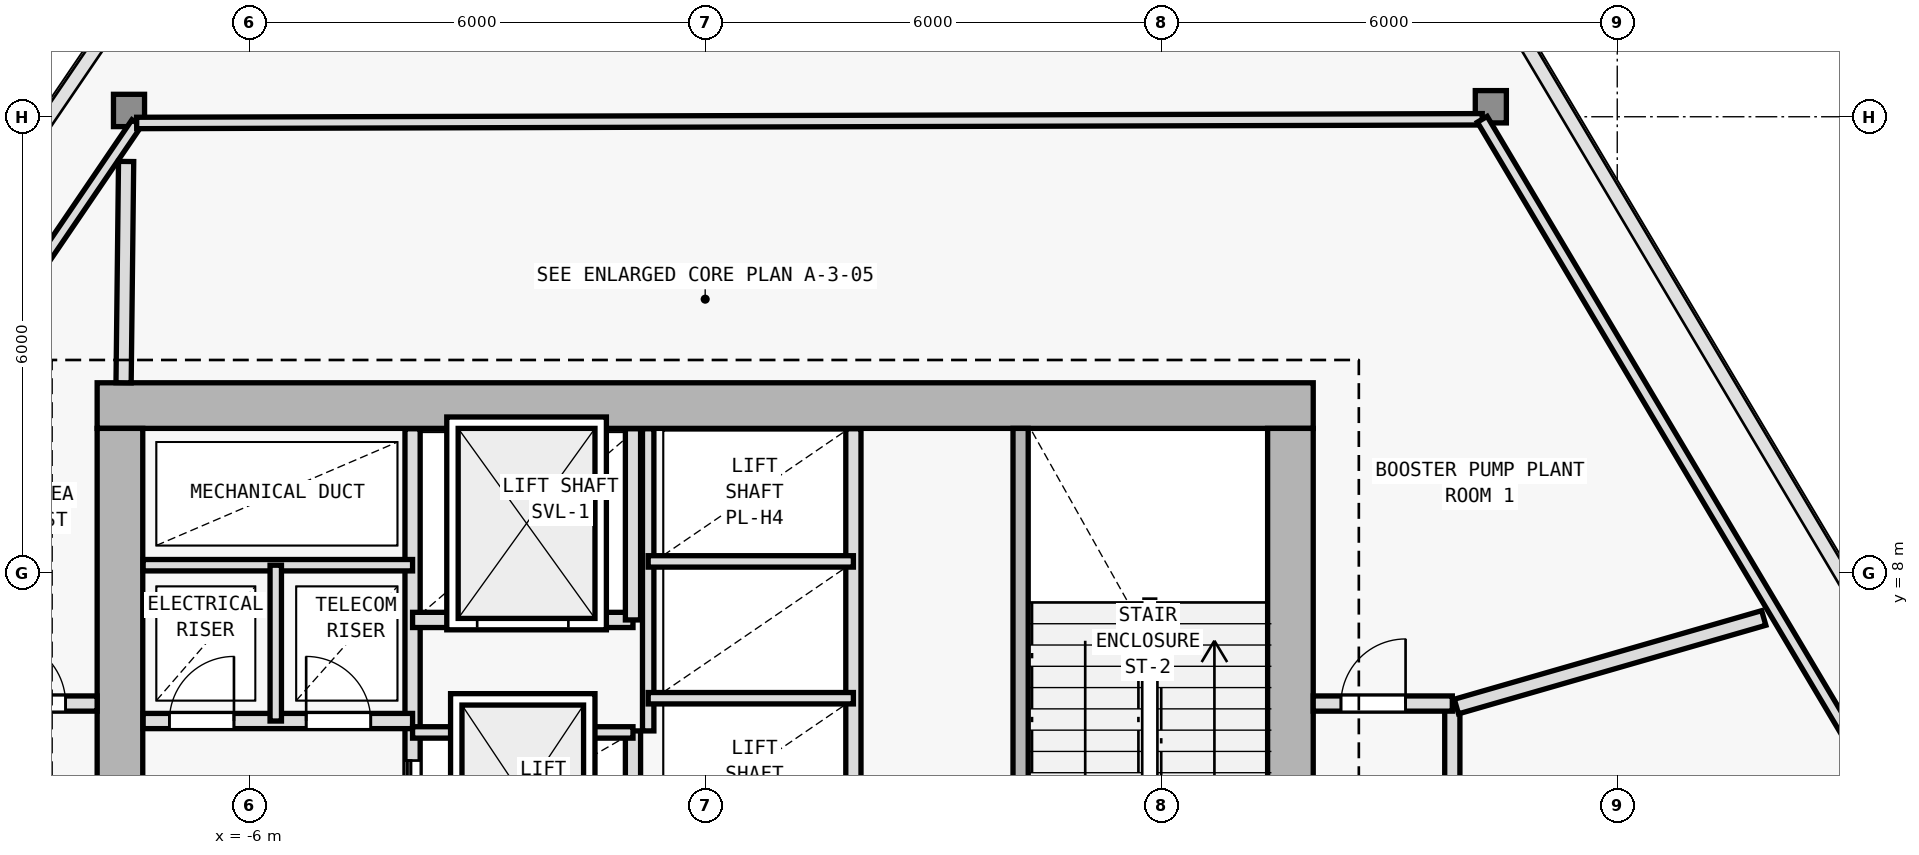
"""IFC4 building model, lengths in metres.
Left out: names, types, materials, properties, quantities, classifications, styles, units other than length and angle.
Written with IfcOpenShell. Run it as: python <this file> out.ifc"""

import sys

from ifc_helpers import new_model, si_unit, direction, frame, frame_2d, origin, origin_2d, place, context, subcontext, project, spatial, rectangle, i_section, extrude, element, fill, save


model = new_model("IFC4")
c1 = context("Model", 3, precision=1e-05, world=origin(), true_north=direction((0.0, 1.0)))
c2 = subcontext(c1, "Body", "Model", "MODEL_VIEW")
j1 = project(units=[si_unit("LENGTHUNIT", "METRE"), si_unit("PLANEANGLEUNIT", "RADIAN")], contexts=[c1])
p1 = place(None, origin())
s1 = spatial("IfcSite", under=j1, at=p1, CompositionType="ELEMENT")
p2 = place(p1, origin())
s2 = spatial("IfcBuilding", under=s1, at=p2, CompositionType="ELEMENT")
p3 = place(p2, frame((0.0, 0.0, 73.2)))
s3 = spatial("IfcBuildingStorey", under=s2, at=p3, CompositionType="ELEMENT", Elevation=73.2)
for number, where, z_axis, x_axis in (
    (1, (7.7, 10.2, 0.0), (0.0, 0.0, 1.0), (1.0, 0.0, 0.0)),
    (2, (-7.7, 10.2, 0.0), (0.0, 0.0, 1.0), (1.0, 0.0, 0.0)),
):
    element("IfcColumn", number, at=place(p3, frame(where, z_axis=z_axis, x_axis=x_axis)), inside=s3, PredefinedType="COLUMN", context=c2, shape_type="SweptSolid", body=[
        extrude(i_section(OverallWidth=0.416, OverallDepth=0.446, WebThickness=0.025, FlangeThickness=0.04, FilletRadius=0.015, at=origin_2d()), origin(), (0.0, 0.0, 1.0), 4.8),
    ])
p4 = place(p3, frame((10.337, 14.132, 0.006), z_axis=(-0.009074296177, -0.001988188488, 0.999956851197), x_axis=(0.214024191307, -0.976828360325, 0.0)))
e3 = element("IfcColumn", 3, at=p4, inside=s3, PredefinedType="COLUMN", context=c2, shape_type="SweptSolid", body=[
    extrude(i_section(OverallWidth=0.409, OverallDepth=0.425, WebThickness=0.021, FlangeThickness=0.034, FilletRadius=0.015, at=origin_2d()), origin(), (0.0, 0.0, 1.0), 4.789),
])
p5 = place(p3, frame((-7.581, 14.083, 0.006), z_axis=(0.006780355843, -0.001988224646, 0.999975036557), x_axis=(0.281384988428, 0.959594960537, 0.0)))
e4 = element("IfcColumn", 4, at=p5, inside=s3, PredefinedType="COLUMN", context=c2, shape_type="SweptSolid", body=[
    extrude(i_section(OverallWidth=0.409, OverallDepth=0.425, WebThickness=0.021, FlangeThickness=0.034, FilletRadius=0.015, at=origin_2d()), origin(), (0.0, 0.0, 1.0), 4.789),
])
p6 = place(p3, frame((8.0, 10.2, 0.0), z_axis=(0.0, 0.0, 1.0), x_axis=(-1.0, 0.0, 0.0)))
e5 = element("IfcWall", 5, at=p6, inside=s3, PredefinedType="SHEAR", context=c2, shape_type="SweptSolid", body=[
    extrude(rectangle(XDim=16.0, YDim=0.6, at=frame_2d((8.0, 0.0))), origin(), (0.0, 0.0, 1.0), 4.5),
])
p7 = place(p3, frame((-7.7, -9.1, 0.0), z_axis=(0.0, 0.0, 1.0), x_axis=(0.0, 1.0, 0.0)))
e6 = element("IfcWall", 6, at=p7, inside=s3, PredefinedType="SHEAR", context=c2, shape_type="SweptSolid", body=[
    extrude(rectangle(XDim=19.0, YDim=0.6, at=frame_2d((9.5, 0.0))), origin(), (0.0, 0.0, 1.0), 4.5),
])
p8 = place(p7, frame((12.65, 0.0, 0.0)))
e7 = element("IfcOpeningElement", 7, at=p8, cuts=e6, PredefinedType="OPENING", context=c2, shape_type="SweptSolid", body=[
    extrude(rectangle(XDim=1.1, YDim=2.15, at=frame_2d((0.55, 1.075))), frame((0.0, 0.31, 0.0), z_axis=(0.0, -1.0, 0.0), x_axis=(1.0, 0.0, 0.0)), (0.0, 0.0, 1.0), 0.62),
])
p9 = place(p3, frame((7.7, 9.9, 0.0), z_axis=(0.0, 0.0, 1.0), x_axis=(0.0, -1.0, 0.0)))
e8 = element("IfcWall", 8, at=p9, inside=s3, PredefinedType="SHEAR", context=c2, shape_type="SweptSolid", body=[
    extrude(rectangle(XDim=19.0, YDim=0.6, at=frame_2d((9.5, 0.0))), origin(), (0.0, 0.0, 1.0), 4.5),
])
p10 = place(p3, frame((-3.85, 1.35, 0.0), z_axis=(0.0, 0.0, 1.0), x_axis=(0.0, 1.0, 0.0)))
e9 = element("IfcWall", 9, at=p10, inside=s3, PredefinedType="SOLIDWALL", context=c2, shape_type="SweptSolid", body=[
    extrude(rectangle(XDim=8.545, YDim=0.2, at=frame_2d((4.272, 0.0))), origin(), (0.0, 0.0, 1.0), 4.5),
])
p11 = place(p10, frame((1.5, 0.0, 0.0)))
e10 = element("IfcOpeningElement", 10, at=p11, cuts=e9, PredefinedType="OPENING", context=c2, shape_type="SweptSolid", body=[
    extrude(rectangle(XDim=1.0, YDim=2.15, at=frame_2d((0.5, 1.075))), frame((0.0, 0.11, 0.0), z_axis=(0.0, -1.0, 0.0), x_axis=(1.0, 0.0, 0.0)), (0.0, 0.0, 1.0), 0.22),
])
p12 = place(p10, frame((3.18, 0.0, 0.0)))
e11 = element("IfcOpeningElement", 11, at=p12, cuts=e9, PredefinedType="OPENING", context=c2, shape_type="SweptSolid", body=[
    extrude(rectangle(XDim=1.0, YDim=2.15, at=frame_2d((0.5, 1.075))), frame((0.0, 0.11, 0.0), z_axis=(0.0, -1.0, 0.0), x_axis=(1.0, 0.0, 0.0)), (0.0, 0.0, 1.0), 0.22),
])
p13 = place(p3, frame((-7.395, 6.05, 0.0), z_axis=(0.0, 0.0, 1.0), x_axis=(1.0, 0.0, 0.0)))
e12 = element("IfcWall", 12, at=p13, inside=s3, PredefinedType="SOLIDWALL", context=c2, shape_type="SweptSolid", body=[
    extrude(rectangle(XDim=3.545, YDim=0.2, at=frame_2d((1.772, 0.0))), origin(), (0.0, 0.0, 1.0), 4.5),
])
p14 = place(p13, frame((0.345, 0.0, 0.0)))
e13 = element("IfcOpeningElement", 13, at=p14, cuts=e12, PredefinedType="OPENING", context=c2, shape_type="SweptSolid", body=[
    extrude(rectangle(XDim=0.85, YDim=2.1, at=frame_2d((0.425, 1.05))), frame((0.0, 0.11, 0.0), z_axis=(0.0, -1.0, 0.0), x_axis=(1.0, 0.0, 0.0)), (0.0, 0.0, 1.0), 0.22),
])
p15 = place(p13, frame((2.145, 0.0, 0.0)))
e14 = element("IfcOpeningElement", 14, at=p15, cuts=e12, PredefinedType="OPENING", context=c2, shape_type="SweptSolid", body=[
    extrude(rectangle(XDim=0.85, YDim=2.1, at=frame_2d((0.425, 1.05))), frame((0.0, 0.11, 0.0), z_axis=(0.0, -1.0, 0.0), x_axis=(1.0, 0.0, 0.0)), (0.0, 0.0, 1.0), 0.22),
])
p16 = place(p3, frame((-7.395, 8.1, 0.0), z_axis=(0.0, 0.0, 1.0), x_axis=(1.0, 0.0, 0.0)))
e15 = element("IfcWall", 15, at=p16, inside=s3, PredefinedType="PARTITIONING", context=c2, shape_type="SweptSolid", body=[
    extrude(rectangle(XDim=3.545, YDim=0.15, at=frame_2d((1.772, 0.0))), origin(), (0.0, 0.0, 1.0), 4.5),
])
p17 = place(p3, frame((-5.65, 6.05, 0.0), z_axis=(0.0, 0.0, 1.0), x_axis=(0.0, 1.0, 0.0)))
e16 = element("IfcWall", 16, at=p17, inside=s3, PredefinedType="PARTITIONING", context=c2, shape_type="SweptSolid", body=[
    extrude(rectangle(XDim=2.05, YDim=0.15, at=frame_2d((1.025, 0.0))), origin(), (0.0, 0.0, 1.0), 4.5),
])
p18 = place(p3, frame((4.15, 2.75, 0.0), z_axis=(0.0, 0.0, 1.0), x_axis=(0.0, 1.0, 0.0)))
e17 = element("IfcWall", 17, at=p18, inside=s3, PredefinedType="SOLIDWALL", context=c2, shape_type="SweptSolid", body=[
    extrude(rectangle(XDim=7.15, YDim=0.2, at=frame_2d((3.575, 0.0))), origin(), (0.0, 0.0, 1.0), 4.5),
])
p19 = place(p18, frame((0.35, 0.0, 0.0)))
e18 = element("IfcOpeningElement", 18, at=p19, cuts=e17, PredefinedType="OPENING", context=c2, shape_type="SweptSolid", body=[
    extrude(rectangle(XDim=1.0, YDim=2.15, at=frame_2d((0.5, 1.075))), frame((0.0, 0.11, 0.0), z_axis=(0.0, -1.0, 0.0), x_axis=(1.0, 0.0, 0.0)), (0.0, 0.0, 1.0), 0.22),
])
p20 = place(p3, frame((-0.95, 2.65, 0.0), z_axis=(0.0, 0.0, 1.0), x_axis=(0.0, 1.0, 0.0)))
e19 = element("IfcWall", 19, at=p20, inside=s3, PredefinedType="SOLIDWALL", context=c2, shape_type="SweptSolid", body=[
    extrude(rectangle(XDim=3.27, YDim=0.2, at=frame_2d((1.635, 0.0))), origin(), (0.0, 0.0, 1.0), 4.5),
])
p21 = place(p3, frame((-3.85, 5.9, 0.0), z_axis=(0.0, 0.0, 1.0), x_axis=(1.0, 0.0, 0.0)))
e20 = element("IfcWall", 20, at=p21, inside=s3, PredefinedType="PARTITIONING", context=c2, shape_type="SweptSolid", body=[
    extrude(rectangle(XDim=2.9, YDim=0.15, at=frame_2d((1.45, 0.0))), origin(), (0.0, 0.0, 1.0), 4.5),
])
p22 = place(p3, frame((-3.85, 7.38, 0.0), z_axis=(0.0, 0.0, 1.0), x_axis=(1.0, 0.0, 0.0)))
e21 = element("IfcWall", 21, at=p22, inside=s3, PredefinedType="SOLIDWALL", context=c2, shape_type="SweptSolid", body=[
    extrude(rectangle(XDim=2.9, YDim=0.2, at=frame_2d((1.45, 0.0))), origin(), (0.0, 0.0, 1.0), 4.5),
])
p23 = place(p22, frame((0.85, 0.0, 0.0)))
e22 = element("IfcOpeningElement", 22, at=p23, cuts=e21, PredefinedType="OPENING", context=c2, shape_type="SweptSolid", body=[
    extrude(rectangle(XDim=1.2, YDim=2.2, at=frame_2d((0.6, 1.1))), frame((0.0, 0.11, 0.0), z_axis=(0.0, -1.0, 0.0), x_axis=(1.0, 0.0, 0.0)), (0.0, 0.0, 1.0), 0.22),
])
p24 = place(p3, frame((-0.95, 7.38, 0.0), z_axis=(0.0, 0.0, 1.0), x_axis=(0.0, 1.0, 0.0)))
e23 = element("IfcWall", 23, at=p24, inside=s3, PredefinedType="SOLIDWALL", context=c2, shape_type="SweptSolid", body=[
    extrude(rectangle(XDim=2.515, YDim=0.2, at=frame_2d((1.258, 0.0))), origin(), (0.0, 0.0, 1.0), 4.5),
])
p25 = place(p3, frame((1.95, 2.65, 0.0), z_axis=(0.0, 0.0, 1.0), x_axis=(0.0, 1.0, 0.0)))
e24 = element("IfcWall", 24, at=p25, inside=s3, PredefinedType="SOLIDWALL", context=c2, shape_type="SweptSolid", body=[
    extrude(rectangle(XDim=7.245, YDim=0.2, at=frame_2d((3.623, 0.0))), origin(), (0.0, 0.0, 1.0), 4.5),
])
p26 = place(p3, frame((-0.75, 5.92, 0.0), z_axis=(0.0, 0.0, 1.0), x_axis=(0.0, 1.0, 0.0)))
e25 = element("IfcWall", 25, at=p26, inside=s3, PredefinedType="PARTITIONING", context=c2, shape_type="SweptSolid", body=[
    extrude(rectangle(XDim=3.975, YDim=0.15, at=frame_2d((1.988, 0.0))), origin(), (0.0, 0.0, 1.0), 4.5),
])
for number, where, z_axis, x_axis in (
    (26, (-0.75, 6.35, 0.0), (0.0, 0.0, 1.0), (1.0, 0.0, 0.0)),
    (27, (-0.75, 8.15, 0.0), (0.0, 0.0, 1.0), (1.0, 0.0, 0.0)),
):
    element("IfcWall", number, at=place(p3, frame(where, z_axis=z_axis, x_axis=x_axis)), inside=s3, PredefinedType="PARTITIONING", context=c2, shape_type="SweptSolid", body=[
        extrude(rectangle(XDim=2.7, YDim=0.15, at=frame_2d((1.35, 0.0))), origin(), (0.0, 0.0, 1.0), 4.5),
    ])
p27 = place(p3, frame((-15.229, 2.527, 0.0), z_axis=(0.0, 0.0, 1.0), x_axis=(0.562470451541, 0.826817386817, 0.0)))
e28 = element("IfcWall", 28, at=p27, inside=s3, PredefinedType="PARTITIONING", context=c2, shape_type="SweptSolid", body=[
    extrude(rectangle(XDim=13.777, YDim=0.15, at=frame_2d((6.888, 0.0))), origin(), (0.0, 0.0, 1.0), 3.875),
])
p28 = place(p3, frame((-7.48, 13.918, 0.0), z_axis=(0.0, 0.0, 1.0), x_axis=(0.999996272289, 0.00273045938, 0.0)))
e29 = element("IfcWall", 29, at=p28, inside=s3, PredefinedType="PARTITIONING", context=c2, shape_type="SweptSolid", body=[
    extrude(rectangle(XDim=17.704, YDim=0.15, at=frame_2d((8.852, 0.0))), origin(), (0.0, 0.0, 1.0), 3.875),
])
p29 = place(p3, frame((10.224, 13.967, 0.0), z_axis=(0.0, 0.0, 1.0), x_axis=(0.511094535589, -0.859524505579, 0.0)))
e30 = element("IfcWall", 30, at=p29, inside=s3, PredefinedType="PARTITIONING", context=c2, shape_type="SweptSolid", body=[
    extrude(rectangle(XDim=13.242, YDim=0.15, at=frame_2d((6.621, 0.0))), origin(), (0.0, 0.0, 1.0), 3.875),
])
p30 = place(p3, frame((-9.83, 6.28, 0.0), z_axis=(0.0, 0.0, 1.0), x_axis=(1.0, 0.0, 0.0)))
e31 = element("IfcWall", 31, at=p30, inside=s3, PredefinedType="SOLIDWALL", context=c2, shape_type="SweptSolid", body=[
    extrude(rectangle(XDim=1.83, YDim=0.2, at=frame_2d((0.915, 0.0))), origin(), (0.0, 0.0, 1.0), 3.925),
])
p31 = place(p30, frame((0.565, 0.0, 0.0)))
e32 = element("IfcOpeningElement", 32, at=p31, cuts=e31, PredefinedType="OPENING", context=c2, shape_type="SweptSolid", body=[
    extrude(rectangle(XDim=0.85, YDim=2.1, at=frame_2d((0.425, 1.05))), frame((0.0, 0.11, 0.0), z_axis=(0.0, -1.0, 0.0), x_axis=(1.0, 0.0, 0.0)), (0.0, 0.0, 1.0), 0.22),
])
p32 = place(p3, frame((9.83, -11.53, 0.0), z_axis=(0.0, 0.0, 1.0), x_axis=(0.0, 1.0, 0.0)))
e33 = element("IfcWall", 33, at=p32, inside=s3, PredefinedType="SOLIDWALL", context=c2, shape_type="SweptSolid", body=[
    extrude(rectangle(XDim=17.81, YDim=0.2, at=frame_2d((8.905, 0.0))), origin(), (0.0, 0.0, 1.0), 3.759),
])
p33 = place(p32, frame((5.542, 0.0, 0.0)))
e34 = element("IfcOpeningElement", 34, at=p33, cuts=e33, PredefinedType="OPENING", context=c2, shape_type="SweptSolid", body=[
    extrude(rectangle(XDim=1.0, YDim=2.15, at=frame_2d((0.5, 1.075))), frame((0.0, 0.11, 0.0), z_axis=(0.0, -1.0, 0.0), x_axis=(1.0, 0.0, 0.0)), (0.0, 0.0, 1.0), 0.22),
])
p34 = place(p32, frame((14.293, 0.0, 0.0)))
e35 = element("IfcOpeningElement", 35, at=p34, cuts=e33, PredefinedType="OPENING", context=c2, shape_type="SweptSolid", body=[
    extrude(rectangle(XDim=1.0, YDim=2.15, at=frame_2d((0.5, 1.075))), frame((0.0, 0.11, 0.0), z_axis=(0.0, -1.0, 0.0), x_axis=(1.0, 0.0, 0.0)), (0.0, 0.0, 1.0), 0.22),
])
p35 = place(p3, frame((8.0, 6.28, 0.0), z_axis=(0.0, 0.0, 1.0), x_axis=(1.0, 0.0, 0.0)))
e36 = element("IfcWall", 36, at=p35, inside=s3, PredefinedType="SOLIDWALL", context=c2, shape_type="SweptSolid", body=[
    extrude(rectangle(XDim=1.83, YDim=0.2, at=frame_2d((0.915, 0.0))), origin(), (0.0, 0.0, 1.0), 4.5),
])
p36 = place(p35, frame((0.365, 0.0, 0.0)))
e37 = element("IfcOpeningElement", 37, at=p36, cuts=e36, PredefinedType="OPENING", context=c2, shape_type="SweptSolid", body=[
    extrude(rectangle(XDim=0.85, YDim=2.1, at=frame_2d((0.425, 1.05))), frame((0.0, 0.11, 0.0), z_axis=(0.0, -1.0, 0.0), x_axis=(1.0, 0.0, 0.0)), (0.0, 0.0, 1.0), 0.22),
])
p37 = place(p3, frame((9.884, 6.24, 0.0), z_axis=(0.0, 0.0, 1.0), x_axis=(0.9608975361, 0.27690418039, 0.0)))
e38 = element("IfcWall", 38, at=p37, inside=s3, PredefinedType="SOLIDWALL", context=c2, shape_type="SweptSolid", body=[
    extrude(rectangle(XDim=4.208, YDim=0.2, at=frame_2d((2.104, 0.0))), origin(), (0.0, 0.0, 1.0), 4.205),
])
p38 = place(p3, frame((-7.652, 10.5, 0.0), z_axis=(0.0, 0.0, 1.0), x_axis=(0.011402914465, 0.999934984657, 0.0)))
e39 = element("IfcWall", 39, at=p38, inside=s3, PredefinedType="SOLIDWALL", context=c2, shape_type="SweptSolid", body=[
    extrude(rectangle(XDim=2.912, YDim=0.2, at=frame_2d((1.456, 0.0))), origin(), (0.0, 0.0, 1.0), 3.875),
])
p39 = place(p14, origin())
e40 = element("IfcDoor", 40, at=p39, inside=s3, OperationType="SINGLE_SWING_RIGHT", PredefinedType="DOOR", context=c2, shape_type="SweptSolid", body=[
    extrude(rectangle(XDim=0.85, YDim=2.1, at=frame_2d((0.425, 1.05))), frame((0.0, 0.025, 0.0), z_axis=(0.0, -1.0, 0.0), x_axis=(1.0, 0.0, 0.0)), (0.0, 0.0, 1.0), 0.05),
])
fill(e13, e40)
p40 = place(p15, origin())
e41 = element("IfcDoor", 41, at=p40, inside=s3, OperationType="SINGLE_SWING_LEFT", PredefinedType="DOOR", context=c2, shape_type="SweptSolid", body=[
    extrude(rectangle(XDim=0.85, YDim=2.1, at=frame_2d((0.425, 1.05))), frame((0.0, 0.025, 0.0), z_axis=(0.0, -1.0, 0.0), x_axis=(1.0, 0.0, 0.0)), (0.0, 0.0, 1.0), 0.05),
])
fill(e14, e41)
p41 = place(p23, origin())
e42 = element("IfcDoor", 42, at=p41, inside=s3, OperationType="DOUBLE_DOOR_SLIDING", PredefinedType="DOOR", context=c2, shape_type="SweptSolid", body=[
    extrude(rectangle(XDim=1.2, YDim=2.2, at=frame_2d((0.6, 1.1))), frame((0.0, 0.025, 0.0), z_axis=(0.0, -1.0, 0.0), x_axis=(1.0, 0.0, 0.0)), (0.0, 0.0, 1.0), 0.05),
])
fill(e22, e42)
p42 = place(p12, origin())
e43 = element("IfcDoor", 43, at=p42, inside=s3, OperationType="DOUBLE_DOOR_SLIDING", PredefinedType="DOOR", context=c2, shape_type="SweptSolid", body=[
    extrude(rectangle(XDim=1.0, YDim=2.15, at=frame_2d((0.5, 1.075))), frame((0.0, 0.025, 0.0), z_axis=(0.0, -1.0, 0.0), x_axis=(1.0, 0.0, 0.0)), (0.0, 0.0, 1.0), 0.05),
])
fill(e11, e43)
p43 = place(p36, origin())
e44 = element("IfcDoor", 44, at=p43, inside=s3, OperationType="SINGLE_SWING_RIGHT", PredefinedType="DOOR", context=c2, shape_type="SweptSolid", body=[
    extrude(rectangle(XDim=0.85, YDim=2.1, at=frame_2d((0.425, 1.05))), frame((0.0, 0.025, 0.0), z_axis=(0.0, -1.0, 0.0), x_axis=(1.0, 0.0, 0.0)), (0.0, 0.0, 1.0), 0.05),
])
fill(e37, e44)
p44 = place(p31, origin())
e45 = element("IfcDoor", 45, at=p44, inside=s3, OperationType="SINGLE_SWING_LEFT", PredefinedType="DOOR", context=c2, shape_type="SweptSolid", body=[
    extrude(rectangle(XDim=0.85, YDim=2.1, at=frame_2d((0.425, 1.05))), frame((0.0, 0.025, 0.0), z_axis=(0.0, -1.0, 0.0), x_axis=(1.0, 0.0, 0.0)), (0.0, 0.0, 1.0), 0.05),
])
fill(e32, e45)
save(model, sys.argv[1])
